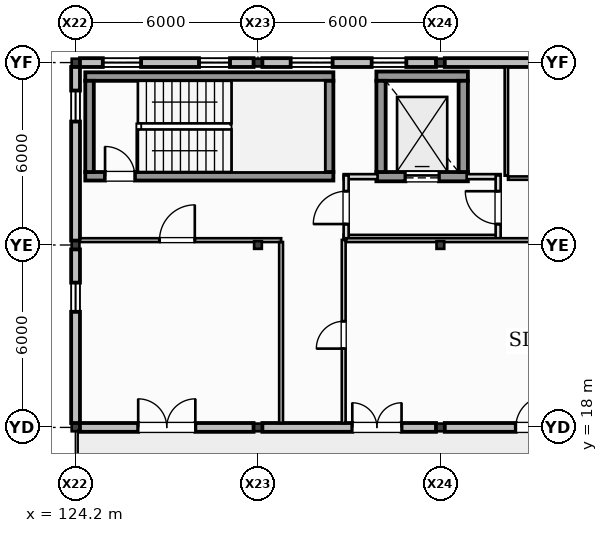
"""IFC4 building model, lengths in metres.
Left out: names, types, materials, properties, quantities, classifications, styles, units other than length and angle.
Written with IfcOpenShell. Run it as: python <this file> out.ifc"""

import sys

from ifc_helpers import new_model, si_unit, direction, frame, frame_2d, origin, origin_2d, place, context, subcontext, project, spatial, rectangle, i_section, extrude, element, fill, save


model = new_model("IFC4")
c1 = context("Model", 3, precision=1e-05, world=origin(), true_north=direction((0.0, 1.0)))
c2 = subcontext(c1, "Body", "Model", "MODEL_VIEW")
j1 = project(units=[si_unit("LENGTHUNIT", "METRE"), si_unit("PLANEANGLEUNIT", "RADIAN")], contexts=[c1])
p1 = place(None, origin())
s1 = spatial("IfcSite", under=j1, at=p1, CompositionType="ELEMENT")
p2 = place(p1, origin())
s2 = spatial("IfcBuilding", under=s1, at=p2, CompositionType="ELEMENT")
p3 = place(p2, frame((0.0, 0.0, 10.0)))
s3 = spatial("IfcBuildingStorey", under=s2, at=p3, CompositionType="ELEMENT", Elevation=10.0)
for number, where, z_axis, x_axis in (
    (1, (124.2, 18.0, 0.0), (0.0, 0.0, 1.0), (1.0, 0.0, 0.0)),
    (2, (124.2, 24.0, 0.0), (0.0, 0.0, 1.0), (1.0, 0.0, 0.0)),
    (3, (124.2, 30.0, 0.0), (0.0, 0.0, 1.0), (1.0, 0.0, 0.0)),
    (4, (130.2, 18.0, 0.0), (0.0, 0.0, 1.0), (1.0, 0.0, 0.0)),
    (5, (130.2, 24.0, 0.0), (0.0, 0.0, 1.0), (1.0, 0.0, 0.0)),
    (6, (130.2, 30.0, 0.0), (0.0, 0.0, 1.0), (1.0, 0.0, 0.0)),
    (7, (136.2, 18.0, 0.0), (0.0, 0.0, 1.0), (1.0, 0.0, 0.0)),
    (8, (136.2, 24.0, 0.0), (0.0, 0.0, 1.0), (1.0, 0.0, 0.0)),
    (9, (136.2, 30.0, 0.0), (0.0, 0.0, 1.0), (1.0, 0.0, 0.0)),
):
    element("IfcColumn", number, at=place(p3, frame(where, z_axis=z_axis, x_axis=x_axis)), inside=s3, PredefinedType="COLUMN", context=c2, shape_type="SweptSolid", body=[
        extrude(i_section(OverallWidth=0.254, OverallDepth=0.253, WebThickness=0.009, FlangeThickness=0.014, at=origin_2d()), origin(), (0.0, 0.0, 1.0), 4.0),
    ])
p4 = place(p3, frame((124.345, 18.0, 0.0), z_axis=(0.0, 0.0, 1.0), x_axis=(1.0, 0.0, 0.0)))
e10 = element("IfcWall", 10, at=p4, inside=s3, PredefinedType="STANDARD", context=c2, shape_type="SweptSolid", body=[
    extrude(rectangle(XDim=5.71, YDim=0.29, at=frame_2d((2.855, 0.0))), origin(), (0.0, 0.0, 1.0), 4.0),
])
p5 = place(p4, frame((1.915, 0.0, 0.0)))
e11 = element("IfcOpeningElement", 11, at=p5, cuts=e10, PredefinedType="OPENING", context=c2, shape_type="SweptSolid", body=[
    extrude(rectangle(XDim=1.88, YDim=2.28, at=frame_2d((0.94, 1.14))), frame((0.0, 0.155, 0.0), z_axis=(0.0, -1.0, 0.0), x_axis=(1.0, 0.0, 0.0)), (0.0, 0.0, 1.0), 0.31),
])
p6 = place(p3, frame((130.345, 18.0, 0.0), z_axis=(0.0, 0.0, 1.0), x_axis=(1.0, 0.0, 0.0)))
e12 = element("IfcWall", 12, at=p6, inside=s3, PredefinedType="STANDARD", context=c2, shape_type="SweptSolid", body=[
    extrude(rectangle(XDim=5.71, YDim=0.29, at=frame_2d((2.855, 0.0))), origin(), (0.0, 0.0, 1.0), 4.0),
])
p7 = place(p6, frame((2.958, 0.0, 0.0)))
e13 = element("IfcOpeningElement", 13, at=p7, cuts=e12, PredefinedType="OPENING", context=c2, shape_type="SweptSolid", body=[
    extrude(rectangle(XDim=1.62, YDim=2.2, at=frame_2d((0.81, 1.1))), frame((0.0, 0.155, 0.0), z_axis=(0.0, -1.0, 0.0), x_axis=(1.0, 0.0, 0.0)), (0.0, 0.0, 1.0), 0.31),
])
p8 = place(p3, frame((136.345, 18.0, 0.0), z_axis=(0.0, 0.0, 1.0), x_axis=(1.0, 0.0, 0.0)))
e14 = element("IfcWall", 14, at=p8, inside=s3, PredefinedType="STANDARD", context=c2, shape_type="SweptSolid", body=[
    extrude(rectangle(XDim=5.71, YDim=0.29, at=frame_2d((2.855, 0.0))), origin(), (0.0, 0.0, 1.0), 4.0),
])
p9 = place(p8, frame((2.335, 0.0, 0.0)))
e15 = element("IfcOpeningElement", 15, at=p9, cuts=e14, PredefinedType="OPENING", context=c2, shape_type="SweptSolid", body=[
    extrude(rectangle(XDim=1.04, YDim=2.16, at=frame_2d((0.52, 1.08))), frame((0.0, 0.155, 0.0), z_axis=(0.0, -1.0, 0.0), x_axis=(1.0, 0.0, 0.0)), (0.0, 0.0, 1.0), 0.31),
])
p10 = place(p3, frame((130.055, 30.0, 0.0), z_axis=(0.0, 0.0, 1.0), x_axis=(-1.0, 0.0, 0.0)))
e16 = element("IfcWall", 16, at=p10, inside=s3, PredefinedType="STANDARD", context=c2, shape_type="SweptSolid", body=[
    extrude(rectangle(XDim=5.71, YDim=0.29, at=frame_2d((2.855, 0.0))), origin(), (0.0, 0.0, 1.0), 4.0),
])
p11 = place(p10, frame((0.775, 0.0, 1.18)))
e17 = element("IfcOpeningElement", 17, at=p11, cuts=e16, PredefinedType="OPENING", context=c2, shape_type="SweptSolid", body=[
    extrude(rectangle(XDim=1.02, YDim=1.02, at=frame_2d((0.51, 0.51))), frame((0.0, 0.155, 0.0), z_axis=(0.0, -1.0, 0.0), x_axis=(1.0, 0.0, 0.0)), (0.0, 0.0, 1.0), 0.31),
])
p12 = place(p10, frame((3.699, 0.0, 0.96)))
e18 = element("IfcOpeningElement", 18, at=p12, cuts=e16, PredefinedType="OPENING", context=c2, shape_type="SweptSolid", body=[
    extrude(rectangle(XDim=1.26, YDim=1.26, at=frame_2d((0.63, 0.63))), frame((0.0, 0.155, 0.0), z_axis=(0.0, -1.0, 0.0), x_axis=(1.0, 0.0, 0.0)), (0.0, 0.0, 1.0), 0.31),
])
p13 = place(p3, frame((136.055, 30.0, 0.0), z_axis=(0.0, 0.0, 1.0), x_axis=(-1.0, 0.0, 0.0)))
e19 = element("IfcWall", 19, at=p13, inside=s3, PredefinedType="STANDARD", context=c2, shape_type="SweptSolid", body=[
    extrude(rectangle(XDim=5.71, YDim=0.29, at=frame_2d((2.855, 0.0))), origin(), (0.0, 0.0, 1.0), 4.0),
])
p14 = place(p13, frame((0.975, 0.0, 1.42)))
e20 = element("IfcOpeningElement", 20, at=p14, cuts=e19, PredefinedType="OPENING", context=c2, shape_type="SweptSolid", body=[
    extrude(rectangle(XDim=1.14, YDim=1.14, at=frame_2d((0.57, 0.57))), frame((0.0, 0.155, 0.0), z_axis=(0.0, -1.0, 0.0), x_axis=(1.0, 0.0, 0.0)), (0.0, 0.0, 1.0), 0.31),
])
p15 = place(p13, frame((3.399, 0.0, 1.28)))
e21 = element("IfcOpeningElement", 21, at=p15, cuts=e19, PredefinedType="OPENING", context=c2, shape_type="SweptSolid", body=[
    extrude(rectangle(XDim=1.38, YDim=1.38, at=frame_2d((0.69, 0.69))), frame((0.0, 0.155, 0.0), z_axis=(0.0, -1.0, 0.0), x_axis=(1.0, 0.0, 0.0)), (0.0, 0.0, 1.0), 0.31),
])
p16 = place(p3, frame((142.055, 30.0, 0.0), z_axis=(0.0, 0.0, 1.0), x_axis=(-1.0, 0.0, 0.0)))
e22 = element("IfcWall", 22, at=p16, inside=s3, PredefinedType="STANDARD", context=c2, shape_type="SweptSolid", body=[
    extrude(rectangle(XDim=5.71, YDim=0.29, at=frame_2d((2.855, 0.0))), origin(), (0.0, 0.0, 1.0), 4.0),
])
p17 = place(p3, frame((124.2, 23.855, 0.0), z_axis=(0.0, 0.0, 1.0), x_axis=(0.0, -1.0, 0.0)))
e23 = element("IfcWall", 23, at=p17, inside=s3, PredefinedType="STANDARD", context=c2, shape_type="SweptSolid", body=[
    extrude(rectangle(XDim=5.71, YDim=0.29, at=frame_2d((2.855, 0.0))), origin(), (0.0, 0.0, 1.0), 2.1),
])
p18 = place(p17, frame((1.092, 0.0, 0.82)))
e24 = element("IfcOpeningElement", 24, at=p18, cuts=e23, PredefinedType="OPENING", context=c2, shape_type="SweptSolid", body=[
    extrude(rectangle(XDim=0.96, YDim=0.96, at=frame_2d((0.48, 0.48))), frame((0.0, 0.155, 0.0), z_axis=(0.0, -1.0, 0.0), x_axis=(1.0, 0.0, 0.0)), (0.0, 0.0, 1.0), 0.31),
])
p19 = place(p3, frame((124.2, 29.855, 0.0), z_axis=(0.0, 0.0, 1.0), x_axis=(0.0, -1.0, 0.0)))
e25 = element("IfcWall", 25, at=p19, inside=s3, PredefinedType="STANDARD", context=c2, shape_type="SweptSolid", body=[
    extrude(rectangle(XDim=5.71, YDim=0.29, at=frame_2d((2.855, 0.0))), origin(), (0.0, 0.0, 1.0), 2.1),
])
p20 = place(p19, frame((0.775, 0.0, 0.82)))
e26 = element("IfcOpeningElement", 26, at=p20, cuts=e25, PredefinedType="OPENING", context=c2, shape_type="SweptSolid", body=[
    extrude(rectangle(XDim=1.02, YDim=1.02, at=frame_2d((0.51, 0.51))), frame((0.0, 0.155, 0.0), z_axis=(0.0, -1.0, 0.0), x_axis=(1.0, 0.0, 0.0)), (0.0, 0.0, 1.0), 0.31),
])
p21 = place(p2, frame((0.0, 0.0, 25.2)))
s4 = spatial("IfcBuildingStorey", under=s2, at=p21, CompositionType="ELEMENT", Elevation=25.2)
for number, where, z_axis, x_axis in (
    (27, (122.973, 18.0, -15.2), (0.0, 0.0, 1.0), (1.0, 0.0, 0.0)),
    (28, (124.155, 30.0, -15.2), (0.0, 0.0, 1.0), (-1.0, 0.0, 0.0)),
):
    element("IfcWall", number, at=place(p21, frame(where, z_axis=z_axis, x_axis=x_axis)), inside=s4, PredefinedType="STANDARD", context=c2, shape_type="SweptSolid", body=[
        extrude(rectangle(XDim=1.182, YDim=0.265, at=frame_2d((0.591, 0.0))), origin(), (0.0, 0.0, 1.0), 2.417),
    ])
p22 = place(p3, frame((124.52, 26.26, 0.0), z_axis=(0.0, 0.0, 1.0), x_axis=(1.0, 0.0, 0.0)))
e29 = element("IfcWall", 29, at=p22, inside=s3, PredefinedType="SHEAR", context=c2, shape_type="SweptSolid", body=[
    extrude(rectangle(XDim=8.16, YDim=0.28, at=frame_2d((4.08, 0.0))), origin(), (0.0, 0.0, 1.0), 3.75),
])
p23 = place(p22, frame((0.65, 0.0, 0.0)))
e30 = element("IfcOpeningElement", 30, at=p23, cuts=e29, PredefinedType="OPENING", context=c2, shape_type="SweptSolid", body=[
    extrude(rectangle(XDim=0.98, YDim=2.15, at=frame_2d((0.49, 1.075))), frame((0.0, 0.15, 0.0), z_axis=(0.0, -1.0, 0.0), x_axis=(1.0, 0.0, 0.0)), (0.0, 0.0, 1.0), 0.3),
])
p24 = place(p3, frame((132.68, 29.54, 0.0), z_axis=(0.0, 0.0, 1.0), x_axis=(-1.0, 0.0, 0.0)))
e31 = element("IfcWall", 31, at=p24, inside=s3, PredefinedType="SHEAR", context=c2, shape_type="SweptSolid", body=[
    extrude(rectangle(XDim=8.16, YDim=0.28, at=frame_2d((4.08, 0.0))), origin(), (0.0, 0.0, 1.0), 3.75),
])
for number, where, z_axis, x_axis in (
    (32, (124.66, 29.4, 0.0), (0.0, 0.0, 1.0), (0.0, -1.0, 0.0)),
    (33, (132.54, 26.4, 0.0), (0.0, 0.0, 1.0), (0.0, 1.0, 0.0)),
):
    element("IfcWall", number, at=place(p3, frame(where, z_axis=z_axis, x_axis=x_axis)), inside=s3, PredefinedType="SHEAR", context=c2, shape_type="SweptSolid", body=[
        extrude(rectangle(XDim=3.0, YDim=0.28, at=frame_2d((1.5, 0.0))), origin(), (0.0, 0.0, 1.0), 3.75),
    ])
p25 = place(p3, frame((134.095, 26.248, 0.0), z_axis=(0.0, 0.0, 1.0), x_axis=(1.0, 0.0, 0.0)))
e34 = element("IfcWall", 34, at=p25, inside=s3, PredefinedType="SHEAR", context=c2, shape_type="SweptSolid", body=[
    extrude(rectangle(XDim=3.01, YDim=0.305, at=frame_2d((1.505, 0.0))), origin(), (0.0, 0.0, 1.0), 3.75),
])
p26 = place(p25, frame((0.955, 0.0, 0.0)))
e35 = element("IfcOpeningElement", 35, at=p26, cuts=e34, PredefinedType="OPENING", context=c2, shape_type="SweptSolid", body=[
    extrude(rectangle(XDim=1.1, YDim=2.15, at=frame_2d((0.55, 1.075))), frame((0.0, 0.162, 0.0), z_axis=(0.0, -1.0, 0.0), x_axis=(1.0, 0.0, 0.0)), (0.0, 0.0, 1.0), 0.325),
])
p27 = place(p3, frame((137.105, 29.552, 0.0), z_axis=(0.0, 0.0, 1.0), x_axis=(-1.0, 0.0, 0.0)))
e36 = element("IfcWall", 36, at=p27, inside=s3, PredefinedType="SHEAR", context=c2, shape_type="SweptSolid", body=[
    extrude(rectangle(XDim=3.01, YDim=0.305, at=frame_2d((1.505, 0.0))), origin(), (0.0, 0.0, 1.0), 3.75),
])
for number, where, z_axis, x_axis in (
    (37, (134.248, 29.4, 0.0), (0.0, 0.0, 1.0), (0.0, -1.0, 0.0)),
    (38, (136.952, 26.4, 0.0), (0.0, 0.0, 1.0), (0.0, 1.0, 0.0)),
):
    element("IfcWall", number, at=place(p3, frame(where, z_axis=z_axis, x_axis=x_axis)), inside=s3, PredefinedType="SHEAR", context=c2, shape_type="SweptSolid", body=[
        extrude(rectangle(XDim=3.0, YDim=0.305, at=frame_2d((1.5, 0.0))), origin(), (0.0, 0.0, 1.0), 3.75),
    ])
p28 = place(p3, frame((133.02, 24.25, 0.0), z_axis=(0.0, 0.0, 1.0), x_axis=(1.0, 0.0, 0.0)))
e39 = element("IfcWall", 39, at=p28, inside=s3, PredefinedType="PARTITIONING", context=c2, shape_type="SweptSolid", body=[
    extrude(rectangle(XDim=5.16, YDim=0.165, at=frame_2d((2.58, 0.0))), origin(), (0.0, 0.0, 1.0), 3.74),
])
for number, where, z_axis, x_axis in (
    (40, (133.02, 26.248, 0.0), (0.0, 0.0, 1.0), (1.0, 0.0, 0.0)),
    (41, (137.065, 26.248, 0.0), (0.0, 0.0, 1.0), (1.0, 0.0, 0.0)),
):
    element("IfcWall", number, at=place(p3, frame(where, z_axis=z_axis, x_axis=x_axis)), inside=s3, PredefinedType="PARTITIONING", context=c2, shape_type="SweptSolid", body=[
        extrude(rectangle(XDim=1.115, YDim=0.165, at=frame_2d((0.558, 0.0))), origin(), (0.0, 0.0, 1.0), 3.74),
    ])
p29 = place(p3, frame((133.1, 24.17, 0.0), z_axis=(0.0, 0.0, 1.0), x_axis=(0.0, 1.0, 0.0)))
e42 = element("IfcWall", 42, at=p29, inside=s3, PredefinedType="PARTITIONING", context=c2, shape_type="SweptSolid", body=[
    extrude(rectangle(XDim=2.118, YDim=0.165, at=frame_2d((1.059, 0.0))), origin(), (0.0, 0.0, 1.0), 3.74),
])
p30 = place(p29, frame((0.519, 0.0, 0.0)))
e43 = element("IfcOpeningElement", 43, at=p30, cuts=e42, PredefinedType="OPENING", context=c2, shape_type="SweptSolid", body=[
    extrude(rectangle(XDim=1.08, YDim=2.14, at=frame_2d((0.54, 1.07))), frame((0.0, 0.093, 0.0), z_axis=(0.0, -1.0, 0.0), x_axis=(1.0, 0.0, 0.0)), (0.0, 0.0, 1.0), 0.185),
])
p31 = place(p3, frame((138.1, 24.17, 0.0), z_axis=(0.0, 0.0, 1.0), x_axis=(0.0, 1.0, 0.0)))
e44 = element("IfcWall", 44, at=p31, inside=s3, PredefinedType="PARTITIONING", context=c2, shape_type="SweptSolid", body=[
    extrude(rectangle(XDim=2.118, YDim=0.165, at=frame_2d((1.059, 0.0))), origin(), (0.0, 0.0, 1.0), 3.74),
])
p32 = place(p31, frame((0.519, 0.0, 0.0)))
e45 = element("IfcOpeningElement", 45, at=p32, cuts=e44, PredefinedType="OPENING", context=c2, shape_type="SweptSolid", body=[
    extrude(rectangle(XDim=1.08, YDim=2.14, at=frame_2d((0.54, 1.07))), frame((0.0, 0.093, 0.0), z_axis=(0.0, -1.0, 0.0), x_axis=(1.0, 0.0, 0.0)), (0.0, 0.0, 1.0), 0.185),
])
p33 = place(p3, frame((124.345, 24.16, 0.0), z_axis=(0.0, 0.0, 1.0), x_axis=(1.0, 0.0, 0.0)))
e46 = element("IfcWall", 46, at=p33, inside=s3, PredefinedType="PARTITIONING", context=c2, shape_type="SweptSolid", body=[
    extrude(rectangle(XDim=6.617, YDim=0.125, at=frame_2d((3.309, 0.0))), origin(), (0.0, 0.0, 1.0), 3.74),
])
p34 = place(p33, frame((2.617, 0.0, 0.0)))
e47 = element("IfcOpeningElement", 47, at=p34, cuts=e46, PredefinedType="OPENING", context=c2, shape_type="SweptSolid", body=[
    extrude(rectangle(XDim=1.16, YDim=2.2, at=frame_2d((0.58, 1.1))), frame((0.0, 0.073, 0.0), z_axis=(0.0, -1.0, 0.0), x_axis=(1.0, 0.0, 0.0)), (0.0, 0.0, 1.0), 0.145),
])
p35 = place(p3, frame((130.96, 24.097, 0.0), z_axis=(0.0, 0.0, 1.0), x_axis=(0.0, -1.0, 0.0)))
e48 = element("IfcWall", 48, at=p35, inside=s3, PredefinedType="PARTITIONING", context=c2, shape_type="SweptSolid", body=[
    extrude(rectangle(XDim=5.952, YDim=0.125, at=frame_2d((2.976, 0.0))), origin(), (0.0, 0.0, 1.0), 3.74),
])
p36 = place(p3, frame((133.02, 18.145, 0.0), z_axis=(0.0, 0.0, 1.0), x_axis=(0.0, 1.0, 0.0)))
e49 = element("IfcWall", 49, at=p36, inside=s3, PredefinedType="PARTITIONING", context=c2, shape_type="SweptSolid", body=[
    extrude(rectangle(XDim=6.022, YDim=0.125, at=frame_2d((3.011, 0.0))), origin(), (0.0, 0.0, 1.0), 3.74),
])
p37 = place(p36, frame((2.447, 0.0, 0.0)))
e50 = element("IfcOpeningElement", 50, at=p37, cuts=e49, PredefinedType="OPENING", context=c2, shape_type="SweptSolid", body=[
    extrude(rectangle(XDim=0.9, YDim=2.1, at=frame_2d((0.45, 1.05))), frame((0.0, 0.073, 0.0), z_axis=(0.0, -1.0, 0.0), x_axis=(1.0, 0.0, 0.0)), (0.0, 0.0, 1.0), 0.145),
])
p38 = place(p3, frame((133.1, 24.16, 0.0), z_axis=(0.0, 0.0, 1.0), x_axis=(1.0, 0.0, 0.0)))
e51 = element("IfcWall", 51, at=p38, inside=s3, PredefinedType="PARTITIONING", context=c2, shape_type="SweptSolid", body=[
    extrude(rectangle(XDim=16.782, YDim=0.125, at=frame_2d((8.391, 0.0))), origin(), (0.0, 0.0, 1.0), 3.74),
])
p39 = place(p3, frame((138.37, 26.28, 0.0), z_axis=(0.0, 0.0, 1.0), x_axis=(0.0, 1.0, 0.0)))
e52 = element("IfcWall", 52, at=p39, inside=s3, PredefinedType="PARTITIONING", context=c2, shape_type="SweptSolid", body=[
    extrude(rectangle(XDim=3.575, YDim=0.11, at=frame_2d((1.788, 0.0))), origin(), (0.0, 0.0, 1.0), 3.74),
])
p40 = place(p3, frame((143.625, 26.2, 0.0), z_axis=(0.0, 0.0, 1.0), x_axis=(-1.0, 0.0, 0.0)))
e53 = element("IfcWall", 53, at=p40, inside=s3, PredefinedType="PARTITIONING", context=c2, shape_type="SweptSolid", body=[
    extrude(rectangle(XDim=5.2, YDim=0.11, at=frame_2d((2.6, 0.0))), origin(), (0.0, 0.0, 1.0), 3.74),
])
p41 = place(p40, frame((2.165, 0.0, 0.0)))
e54 = element("IfcOpeningElement", 54, at=p41, cuts=e53, PredefinedType="OPENING", context=c2, shape_type="SweptSolid", body=[
    extrude(rectangle(XDim=0.87, YDim=2.06, at=frame_2d((0.435, 1.03))), frame((0.0, 0.065, 0.0), z_axis=(0.0, -1.0, 0.0), x_axis=(1.0, 0.0, 0.0)), (0.0, 0.0, 1.0), 0.13),
])
p42 = place(p5, frame((1.88, 0.0, 0.0), z_axis=(0.0, 0.0, 1.0), x_axis=(-1.0, 0.0, 0.0)))
e55 = element("IfcDoor", 55, at=p42, inside=s3, OperationType="DOUBLE_DOOR_SINGLE_SWING", PredefinedType="DOOR", context=c2, shape_type="SweptSolid", body=[
    extrude(rectangle(XDim=1.88, YDim=2.28, at=frame_2d((0.94, 1.14))), frame((0.0, 0.025, 0.0), z_axis=(0.0, -1.0, 0.0), x_axis=(1.0, 0.0, 0.0)), (0.0, 0.0, 1.0), 0.05),
])
fill(e11, e55)
p43 = place(p7, frame((1.62, 0.0, 0.0), z_axis=(0.0, 0.0, 1.0), x_axis=(-1.0, 0.0, 0.0)))
e56 = element("IfcDoor", 56, at=p43, inside=s3, OperationType="DOUBLE_DOOR_SINGLE_SWING", PredefinedType="DOOR", context=c2, shape_type="SweptSolid", body=[
    extrude(rectangle(XDim=1.62, YDim=2.2, at=frame_2d((0.81, 1.1))), frame((0.0, 0.025, 0.0), z_axis=(0.0, -1.0, 0.0), x_axis=(1.0, 0.0, 0.0)), (0.0, 0.0, 1.0), 0.05),
])
fill(e13, e56)
p44 = place(p9, frame((1.04, 0.0, 0.0), z_axis=(0.0, 0.0, 1.0), x_axis=(-1.0, 0.0, 0.0)))
e57 = element("IfcDoor", 57, at=p44, inside=s3, OperationType="SINGLE_SWING_RIGHT", PredefinedType="DOOR", context=c2, shape_type="SweptSolid", body=[
    extrude(rectangle(XDim=1.04, YDim=2.16, at=frame_2d((0.52, 1.08))), frame((0.0, 0.025, 0.0), z_axis=(0.0, -1.0, 0.0), x_axis=(1.0, 0.0, 0.0)), (0.0, 0.0, 1.0), 0.05),
])
fill(e15, e57)
p45 = place(p11, origin())
e58 = element("IfcWindow", 58, at=p45, inside=s3, PartitioningType="SINGLE_PANEL", PredefinedType="WINDOW", context=c2, shape_type="SweptSolid", body=[
    extrude(rectangle(XDim=1.02, YDim=1.02, at=frame_2d((0.51, 0.51))), frame((0.0, 0.03, 0.0), z_axis=(0.0, -1.0, 0.0), x_axis=(1.0, 0.0, 0.0)), (0.0, 0.0, 1.0), 0.06),
])
fill(e17, e58)
p46 = place(p12, origin())
e59 = element("IfcWindow", 59, at=p46, inside=s3, PartitioningType="SINGLE_PANEL", PredefinedType="WINDOW", context=c2, shape_type="SweptSolid", body=[
    extrude(rectangle(XDim=1.26, YDim=1.26, at=frame_2d((0.63, 0.63))), frame((0.0, 0.03, 0.0), z_axis=(0.0, -1.0, 0.0), x_axis=(1.0, 0.0, 0.0)), (0.0, 0.0, 1.0), 0.06),
])
fill(e18, e59)
p47 = place(p14, origin())
e60 = element("IfcWindow", 60, at=p47, inside=s3, PartitioningType="SINGLE_PANEL", PredefinedType="WINDOW", context=c2, shape_type="SweptSolid", body=[
    extrude(rectangle(XDim=1.14, YDim=1.14, at=frame_2d((0.57, 0.57))), frame((0.0, 0.03, 0.0), z_axis=(0.0, -1.0, 0.0), x_axis=(1.0, 0.0, 0.0)), (0.0, 0.0, 1.0), 0.06),
])
fill(e20, e60)
p48 = place(p15, origin())
e61 = element("IfcWindow", 61, at=p48, inside=s3, PartitioningType="SINGLE_PANEL", PredefinedType="WINDOW", context=c2, shape_type="SweptSolid", body=[
    extrude(rectangle(XDim=1.38, YDim=1.38, at=frame_2d((0.69, 0.69))), frame((0.0, 0.03, 0.0), z_axis=(0.0, -1.0, 0.0), x_axis=(1.0, 0.0, 0.0)), (0.0, 0.0, 1.0), 0.06),
])
fill(e21, e61)
p49 = place(p18, origin())
e62 = element("IfcWindow", 62, at=p49, inside=s3, PartitioningType="SINGLE_PANEL", PredefinedType="WINDOW", context=c2, shape_type="SweptSolid", body=[
    extrude(rectangle(XDim=0.96, YDim=0.96, at=frame_2d((0.48, 0.48))), frame((0.0, 0.03, 0.0), z_axis=(0.0, -1.0, 0.0), x_axis=(1.0, 0.0, 0.0)), (0.0, 0.0, 1.0), 0.06),
])
fill(e24, e62)
p50 = place(p20, origin())
e63 = element("IfcWindow", 63, at=p50, inside=s3, PartitioningType="SINGLE_PANEL", PredefinedType="WINDOW", context=c2, shape_type="SweptSolid", body=[
    extrude(rectangle(XDim=1.02, YDim=1.02, at=frame_2d((0.51, 0.51))), frame((0.0, 0.03, 0.0), z_axis=(0.0, -1.0, 0.0), x_axis=(1.0, 0.0, 0.0)), (0.0, 0.0, 1.0), 0.06),
])
fill(e26, e63)
p51 = place(p23, origin())
e64 = element("IfcDoor", 64, at=p51, inside=s3, OperationType="SINGLE_SWING_LEFT", PredefinedType="DOOR", context=c2, shape_type="SweptSolid", body=[
    extrude(rectangle(XDim=0.98, YDim=2.15, at=frame_2d((0.49, 1.075))), frame((0.0, 0.025, 0.0), z_axis=(0.0, -1.0, 0.0), x_axis=(1.0, 0.0, 0.0)), (0.0, 0.0, 1.0), 0.05),
])
fill(e30, e64)
p52 = place(p26, origin())
e65 = element("IfcDoor", 65, at=p52, inside=s3, OperationType="SLIDING_TO_LEFT", PredefinedType="DOOR", context=c2, shape_type="SweptSolid", body=[
    extrude(rectangle(XDim=1.1, YDim=2.15, at=frame_2d((0.55, 1.075))), frame((0.0, 0.025, 0.0), z_axis=(0.0, -1.0, 0.0), x_axis=(1.0, 0.0, 0.0)), (0.0, 0.0, 1.0), 0.05),
])
fill(e35, e65)
p53 = place(p30, frame((1.08, 0.0, 0.0), z_axis=(0.0, 0.0, 1.0), x_axis=(-1.0, 0.0, 0.0)))
e66 = element("IfcDoor", 66, at=p53, inside=s3, OperationType="SINGLE_SWING_LEFT", PredefinedType="DOOR", context=c2, shape_type="SweptSolid", body=[
    extrude(rectangle(XDim=1.08, YDim=2.14, at=frame_2d((0.54, 1.07))), frame((0.0, 0.025, 0.0), z_axis=(0.0, -1.0, 0.0), x_axis=(1.0, 0.0, 0.0)), (0.0, 0.0, 1.0), 0.05),
])
fill(e43, e66)
p54 = place(p32, origin())
e67 = element("IfcDoor", 67, at=p54, inside=s3, OperationType="SINGLE_SWING_RIGHT", PredefinedType="DOOR", context=c2, shape_type="SweptSolid", body=[
    extrude(rectangle(XDim=1.08, YDim=2.14, at=frame_2d((0.54, 1.07))), frame((0.0, 0.025, 0.0), z_axis=(0.0, -1.0, 0.0), x_axis=(1.0, 0.0, 0.0)), (0.0, 0.0, 1.0), 0.05),
])
fill(e45, e67)
p55 = place(p34, frame((1.16, 0.0, 0.0), z_axis=(0.0, 0.0, 1.0), x_axis=(-1.0, 0.0, 0.0)))
e68 = element("IfcDoor", 68, at=p55, inside=s3, OperationType="SINGLE_SWING_RIGHT", PredefinedType="DOOR", context=c2, shape_type="SweptSolid", body=[
    extrude(rectangle(XDim=1.16, YDim=2.2, at=frame_2d((0.58, 1.1))), frame((0.0, 0.025, 0.0), z_axis=(0.0, -1.0, 0.0), x_axis=(1.0, 0.0, 0.0)), (0.0, 0.0, 1.0), 0.05),
])
fill(e47, e68)
p56 = place(p37, frame((0.9, 0.0, 0.0), z_axis=(0.0, 0.0, 1.0), x_axis=(-1.0, 0.0, 0.0)))
e69 = element("IfcDoor", 69, at=p56, inside=s3, OperationType="SINGLE_SWING_LEFT", PredefinedType="DOOR", context=c2, shape_type="SweptSolid", body=[
    extrude(rectangle(XDim=0.9, YDim=2.1, at=frame_2d((0.45, 1.05))), frame((0.0, 0.025, 0.0), z_axis=(0.0, -1.0, 0.0), x_axis=(1.0, 0.0, 0.0)), (0.0, 0.0, 1.0), 0.05),
])
fill(e50, e69)
save(model, sys.argv[1])
